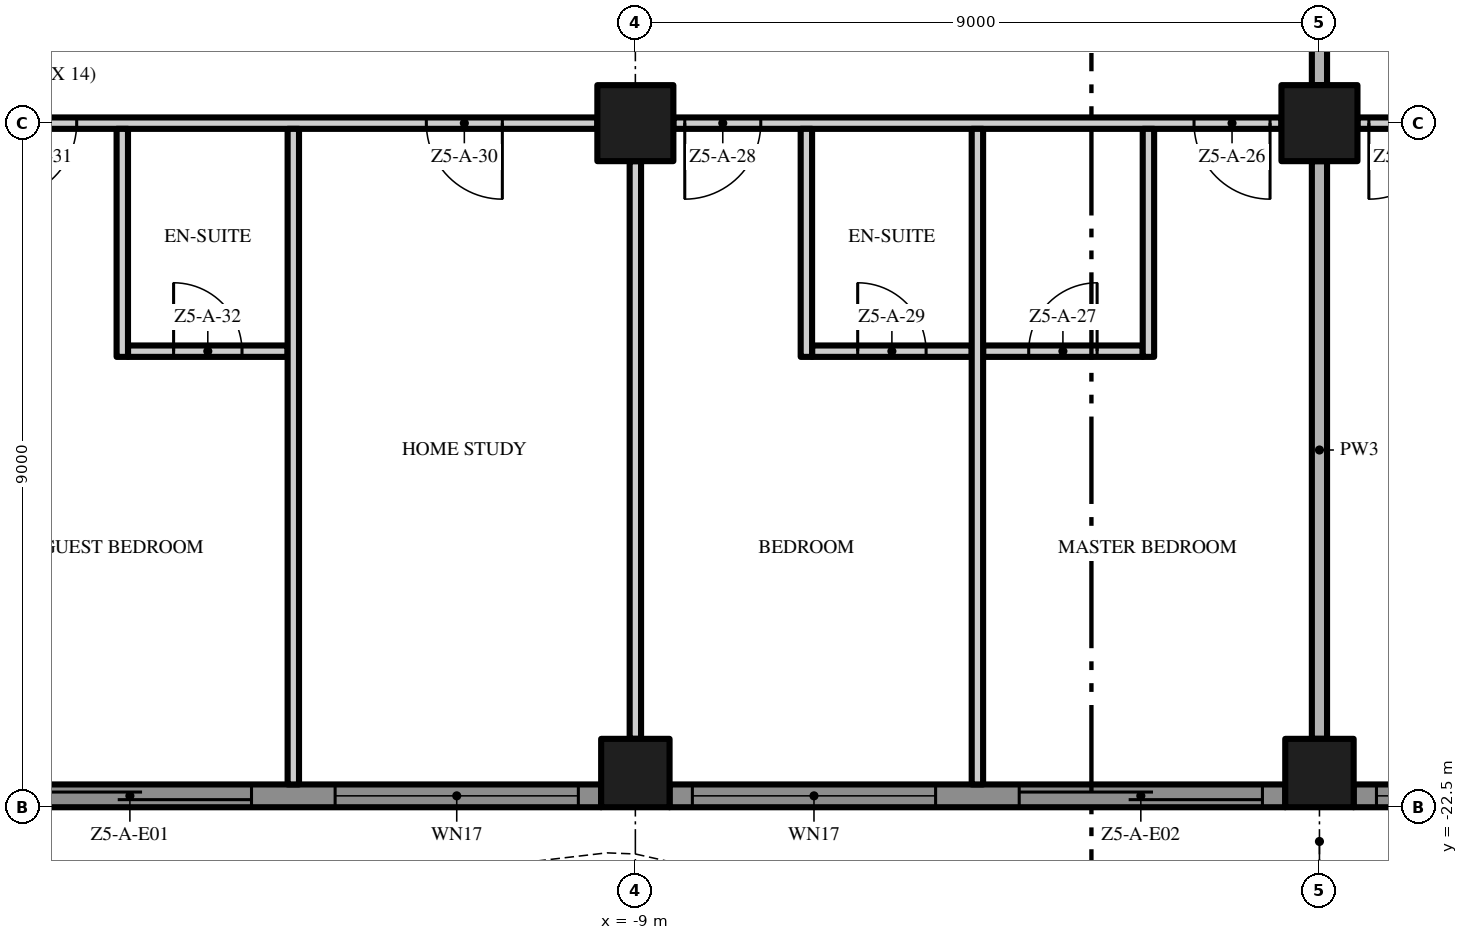
"""IFC4 building model, lengths in metres.
Left out: names, types, materials, properties, quantities, classifications, styles, units other than length and angle.
Written with IfcOpenShell. Run it as: python <this file> out.ifc"""

import sys

from ifc_helpers import new_model, si_unit, direction, frame, frame_2d, origin, origin_2d, place, context, subcontext, project, spatial, polyline, rectangle, outline, extrude, element, fill, save


model = new_model("IFC4")
c1 = context("Model", 3, precision=1e-05, world=origin(), true_north=direction((0.0, 1.0)))
c2 = subcontext(c1, "Body", "Model", "MODEL_VIEW")
j1 = project(units=[si_unit("LENGTHUNIT", "METRE"), si_unit("PLANEANGLEUNIT", "RADIAN")], contexts=[c1])
p1 = place(None, origin())
s1 = spatial("IfcSite", under=j1, at=p1, CompositionType="ELEMENT")
p2 = place(p1, origin())
s2 = spatial("IfcBuilding", under=s1, at=p2, CompositionType="ELEMENT")
p3 = place(p2, frame((0.0, 0.0, 238.8)))
s3 = spatial("IfcBuildingStorey", under=s2, at=p3, CompositionType="ELEMENT", Elevation=238.8)
p4 = place(p3, frame((-9.0, -13.5, 0.0), z_axis=(0.0, 0.0, 1.0), x_axis=(1.0, 0.0, 0.0)))
e1 = element("IfcColumn", 1, at=p4, inside=s3, PredefinedType="COLUMN", context=c2, shape_type="SweptSolid", body=[
    extrude(rectangle(XDim=1.0, YDim=1.0, at=origin_2d()), origin(), (0.0, 0.0, 1.0), 3.5),
])
p5 = place(p3, frame((-9.0, -22.05, 0.0), z_axis=(0.0, 0.0, 1.0), x_axis=(1.0, 0.0, 0.0)))
e2 = element("IfcColumn", 2, at=p5, inside=s3, PredefinedType="COLUMN", context=c2, shape_type="SweptSolid", body=[
    extrude(rectangle(XDim=0.9, YDim=0.9, at=origin_2d()), origin(), (0.0, 0.0, 1.0), 3.5),
])
p6 = place(p3, frame((0.0, -13.5, 0.0), z_axis=(0.0, 0.0, 1.0), x_axis=(1.0, 0.0, 0.0)))
e3 = element("IfcColumn", 3, at=p6, inside=s3, PredefinedType="COLUMN", context=c2, shape_type="SweptSolid", body=[
    extrude(rectangle(XDim=1.0, YDim=1.0, at=origin_2d()), origin(), (0.0, 0.0, 1.0), 3.5),
])
p7 = place(p3, frame((0.0, -22.05, 0.0), z_axis=(0.0, 0.0, 1.0), x_axis=(1.0, 0.0, 0.0)))
e4 = element("IfcColumn", 4, at=p7, inside=s3, PredefinedType="COLUMN", context=c2, shape_type="SweptSolid", body=[
    extrude(rectangle(XDim=0.9, YDim=0.9, at=origin_2d()), origin(), (0.0, 0.0, 1.0), 3.5),
])
p8 = place(p3, frame((-9.45, -22.35, 0.0), z_axis=(0.0, 0.0, 1.0), x_axis=(-1.0, 0.0, 0.0)))
e5 = element("IfcWall", 5, at=p8, inside=s3, PredefinedType="SOLIDWALL", context=c2, shape_type="SweptSolid", body=[
    extrude(rectangle(XDim=8.1, YDim=0.3, at=frame_2d((4.05, 0.0))), origin(), (0.0, 0.0, 1.0), 3.5),
])
p9 = place(p8, frame((4.6, 0.0, 0.0)))
e6 = element("IfcOpeningElement", 6, at=p9, cuts=e5, PredefinedType="OPENING", context=c2, shape_type="SweptSolid", body=[
    extrude(rectangle(XDim=3.2, YDim=2.4, at=frame_2d((1.6, 1.2))), frame((0.0, 0.16, 0.0), z_axis=(0.0, -1.0, 0.0), x_axis=(1.0, 0.0, 0.0)), (0.0, 0.0, 1.0), 0.32),
])
p10 = place(p8, frame((0.3, 0.0, 0.45)))
e7 = element("IfcOpeningElement", 7, at=p10, cuts=e5, PredefinedType="OPENING", context=c2, shape_type="SweptSolid", body=[
    extrude(rectangle(XDim=3.2, YDim=2.65, at=frame_2d((1.6, 1.325))), frame((0.0, 0.16, 0.0), z_axis=(0.0, -1.0, 0.0), x_axis=(1.0, 0.0, 0.0)), (0.0, 0.0, 1.0), 0.32),
])
p11 = place(p3, frame((-0.45, -22.35, 0.0), z_axis=(0.0, 0.0, 1.0), x_axis=(-1.0, 0.0, 0.0)))
e8 = element("IfcWall", 8, at=p11, inside=s3, PredefinedType="SOLIDWALL", context=c2, shape_type="SweptSolid", body=[
    extrude(rectangle(XDim=8.1, YDim=0.3, at=frame_2d((4.05, 0.0))), origin(), (0.0, 0.0, 1.0), 3.5),
])
p12 = place(p11, frame((4.6, 0.0, 0.45)))
e9 = element("IfcOpeningElement", 9, at=p12, cuts=e8, PredefinedType="OPENING", context=c2, shape_type="SweptSolid", body=[
    extrude(rectangle(XDim=3.2, YDim=2.65, at=frame_2d((1.6, 1.325))), frame((0.0, 0.16, 0.0), z_axis=(0.0, -1.0, 0.0), x_axis=(1.0, 0.0, 0.0)), (0.0, 0.0, 1.0), 0.32),
])
p13 = place(p11, frame((0.3, 0.0, 0.0)))
e10 = element("IfcOpeningElement", 10, at=p13, cuts=e8, PredefinedType="OPENING", context=c2, shape_type="SweptSolid", body=[
    extrude(rectangle(XDim=3.2, YDim=2.4, at=frame_2d((1.6, 1.2))), frame((0.0, 0.16, 0.0), z_axis=(0.0, -1.0, 0.0), x_axis=(1.0, 0.0, 0.0)), (0.0, 0.0, 1.0), 0.32),
])
p14 = place(p3, frame((8.55, -22.35, 0.0), z_axis=(0.0, 0.0, 1.0), x_axis=(-1.0, 0.0, 0.0)))
e11 = element("IfcWall", 11, at=p14, inside=s3, PredefinedType="SOLIDWALL", context=c2, shape_type="SweptSolid", body=[
    extrude(rectangle(XDim=8.1, YDim=0.3, at=frame_2d((4.05, 0.0))), origin(), (0.0, 0.0, 1.0), 3.5),
])
p15 = place(p14, frame((4.6, 0.0, 0.45)))
e12 = element("IfcOpeningElement", 12, at=p15, cuts=e11, PredefinedType="OPENING", context=c2, shape_type="SweptSolid", body=[
    extrude(rectangle(XDim=3.2, YDim=2.65, at=frame_2d((1.6, 1.325))), frame((0.0, 0.16, 0.0), z_axis=(0.0, -1.0, 0.0), x_axis=(1.0, 0.0, 0.0)), (0.0, 0.0, 1.0), 0.32),
])
p16 = place(p14, frame((0.3, 0.0, 0.45)))
e13 = element("IfcOpeningElement", 13, at=p16, cuts=e11, PredefinedType="OPENING", context=c2, shape_type="SweptSolid", body=[
    extrude(rectangle(XDim=3.2, YDim=2.65, at=frame_2d((1.6, 1.325))), frame((0.0, 0.16, 0.0), z_axis=(0.0, -1.0, 0.0), x_axis=(1.0, 0.0, 0.0)), (0.0, 0.0, 1.0), 0.32),
])
p17 = place(p3, origin())
e14 = element("IfcWall", 14, at=p17, inside=s3, PredefinedType="USERDEFINED", context=c2, shape_type="SweptSolid", body=[
    extrude(outline(polyline([(-22.5, -23.451), (-21.0, -24.112), (-19.5, -24.845), (-18.0, -25.369), (-16.875, -25.5), (-16.5, -25.485), (-15.0, -25.149), (-13.5, -24.488), (-12.0, -23.755), (-10.5, -23.231), (-9.375, -23.1), (-9.0, -23.115), (-7.5, -23.451), (-6.0, -24.112), (-4.5, -24.845), (-3.0, -25.369), (-1.875, -25.5), (-1.5, -25.485), (0.0, -25.149), (1.5, -24.488), (3.0, -23.755), (4.5, -23.231), (5.625, -23.1), (6.0, -23.115), (7.5, -23.451), (9.0, -24.112), (10.5, -24.845), (12.0, -25.369), (13.125, -25.5), (13.5, -25.485), (15.0, -25.149), (16.5, -24.488), (18.0, -23.755), (19.5, -23.231), (20.625, -23.1), (21.0, -23.115), (22.5, -23.451), (22.555, -23.208), (21.033, -22.866), (20.615, -22.849), (19.444, -22.986), (17.904, -23.524), (16.395, -24.261), (14.921, -24.91), (13.467, -25.236), (13.135, -25.249), (12.056, -25.124), (10.596, -24.614), (9.105, -23.885), (7.579, -23.213), (6.033, -22.866), (5.615, -22.849), (4.444, -22.986), (2.904, -23.524), (1.395, -24.261), (-0.079, -24.91), (-1.533, -25.236), (-1.865, -25.249), (-2.944, -25.124), (-4.404, -24.614), (-5.895, -23.885), (-7.421, -23.213), (-8.967, -22.866), (-9.385, -22.849), (-10.556, -22.986), (-12.096, -23.524), (-13.605, -24.261), (-15.079, -24.91), (-16.533, -25.236), (-16.865, -25.249), (-17.944, -25.124), (-19.404, -24.614), (-20.895, -23.885), (-22.399, -23.223), (-22.5, -23.451)])), origin(), (0.0, 0.0, 1.0), 0.9),
])
p18 = place(p3, frame((-15.675, -16.5, 0.0), z_axis=(0.0, 0.0, 1.0), x_axis=(1.0, 0.0, 0.0)))
e15 = element("IfcWall", 15, at=p18, inside=s3, PredefinedType="PARTITIONING", context=c2, shape_type="SweptSolid", body=[
    extrude(rectangle(XDim=2.1, YDim=0.15, at=frame_2d((1.05, 0.0))), origin(), (0.0, 0.0, 1.0), 3.5),
])
p19 = place(p18, frame((0.6, 0.0, 0.0)))
e16 = element("IfcOpeningElement", 16, at=p19, cuts=e15, PredefinedType="OPENING", context=c2, shape_type="SweptSolid", body=[
    extrude(rectangle(XDim=0.9, YDim=2.1, at=frame_2d((0.45, 1.05))), frame((0.0, 0.085, 0.0), z_axis=(0.0, -1.0, 0.0), x_axis=(1.0, 0.0, 0.0)), (0.0, 0.0, 1.0), 0.17),
])
p20 = place(p3, frame((-6.675, -16.5, 0.0), z_axis=(0.0, 0.0, 1.0), x_axis=(1.0, 0.0, 0.0)))
e17 = element("IfcWall", 17, at=p20, inside=s3, PredefinedType="PARTITIONING", context=c2, shape_type="SweptSolid", body=[
    extrude(rectangle(XDim=2.1, YDim=0.15, at=frame_2d((1.05, 0.0))), origin(), (0.0, 0.0, 1.0), 3.5),
])
p21 = place(p20, frame((0.6, 0.0, 0.0)))
e18 = element("IfcOpeningElement", 18, at=p21, cuts=e17, PredefinedType="OPENING", context=c2, shape_type="SweptSolid", body=[
    extrude(rectangle(XDim=0.9, YDim=2.1, at=frame_2d((0.45, 1.05))), frame((0.0, 0.085, 0.0), z_axis=(0.0, -1.0, 0.0), x_axis=(1.0, 0.0, 0.0)), (0.0, 0.0, 1.0), 0.17),
])
p22 = place(p3, frame((-4.425, -16.5, 0.0), z_axis=(0.0, 0.0, 1.0), x_axis=(1.0, 0.0, 0.0)))
e19 = element("IfcWall", 19, at=p22, inside=s3, PredefinedType="PARTITIONING", context=c2, shape_type="SweptSolid", body=[
    extrude(rectangle(XDim=2.1, YDim=0.15, at=frame_2d((1.05, 0.0))), origin(), (0.0, 0.0, 1.0), 3.5),
])
p23 = place(p22, frame((0.6, 0.0, 0.0)))
e20 = element("IfcOpeningElement", 20, at=p23, cuts=e19, PredefinedType="OPENING", context=c2, shape_type="SweptSolid", body=[
    extrude(rectangle(XDim=0.9, YDim=2.1, at=frame_2d((0.45, 1.05))), frame((0.0, 0.085, 0.0), z_axis=(0.0, -1.0, 0.0), x_axis=(1.0, 0.0, 0.0)), (0.0, 0.0, 1.0), 0.17),
])
p24 = place(p3, frame((-9.5, -13.5, 0.0), z_axis=(0.0, 0.0, 1.0), x_axis=(-1.0, 0.0, 0.0)))
e21 = element("IfcWall", 21, at=p24, inside=s3, PredefinedType="PARTITIONING", context=c2, shape_type="SweptSolid", body=[
    extrude(rectangle(XDim=8.0, YDim=0.15, at=frame_2d((4.0, 0.0))), origin(), (0.0, 0.0, 1.0), 3.5),
])
p25 = place(p24, frame((1.25, 0.0, 0.0)))
e22 = element("IfcOpeningElement", 22, at=p25, cuts=e21, PredefinedType="OPENING", context=c2, shape_type="SweptSolid", body=[
    extrude(rectangle(XDim=1.0, YDim=2.4, at=frame_2d((0.5, 1.2))), frame((0.0, 0.085, 0.0), z_axis=(0.0, -1.0, 0.0), x_axis=(1.0, 0.0, 0.0)), (0.0, 0.0, 1.0), 0.17),
])
p26 = place(p24, frame((6.85, 0.0, 0.0)))
e23 = element("IfcOpeningElement", 23, at=p26, cuts=e21, PredefinedType="OPENING", context=c2, shape_type="SweptSolid", body=[
    extrude(rectangle(XDim=1.0, YDim=2.4, at=frame_2d((0.5, 1.2))), frame((0.0, 0.085, 0.0), z_axis=(0.0, -1.0, 0.0), x_axis=(1.0, 0.0, 0.0)), (0.0, 0.0, 1.0), 0.17),
])
p27 = place(p3, frame((-0.5, -13.5, 0.0), z_axis=(0.0, 0.0, 1.0), x_axis=(-1.0, 0.0, 0.0)))
e24 = element("IfcWall", 24, at=p27, inside=s3, PredefinedType="PARTITIONING", context=c2, shape_type="SweptSolid", body=[
    extrude(rectangle(XDim=8.0, YDim=0.15, at=frame_2d((4.0, 0.0))), origin(), (0.0, 0.0, 1.0), 3.5),
])
p28 = place(p27, frame((0.15, 0.0, 0.0)))
e25 = element("IfcOpeningElement", 25, at=p28, cuts=e24, PredefinedType="OPENING", context=c2, shape_type="SweptSolid", body=[
    extrude(rectangle(XDim=1.0, YDim=2.4, at=frame_2d((0.5, 1.2))), frame((0.0, 0.085, 0.0), z_axis=(0.0, -1.0, 0.0), x_axis=(1.0, 0.0, 0.0)), (0.0, 0.0, 1.0), 0.17),
])
p29 = place(p27, frame((6.85, 0.0, 0.0)))
e26 = element("IfcOpeningElement", 26, at=p29, cuts=e24, PredefinedType="OPENING", context=c2, shape_type="SweptSolid", body=[
    extrude(rectangle(XDim=1.0, YDim=2.4, at=frame_2d((0.5, 1.2))), frame((0.0, 0.085, 0.0), z_axis=(0.0, -1.0, 0.0), x_axis=(1.0, 0.0, 0.0)), (0.0, 0.0, 1.0), 0.17),
])
p30 = place(p3, frame((8.5, -13.5, 0.0), z_axis=(0.0, 0.0, 1.0), x_axis=(-1.0, 0.0, 0.0)))
e27 = element("IfcWall", 27, at=p30, inside=s3, PredefinedType="PARTITIONING", context=c2, shape_type="SweptSolid", body=[
    extrude(rectangle(XDim=8.0, YDim=0.15, at=frame_2d((4.0, 0.0))), origin(), (0.0, 0.0, 1.0), 3.5),
])
p31 = place(p30, frame((1.25, 0.0, 0.0)))
e28 = element("IfcOpeningElement", 28, at=p31, cuts=e27, PredefinedType="OPENING", context=c2, shape_type="SweptSolid", body=[
    extrude(rectangle(XDim=1.0, YDim=2.4, at=frame_2d((0.5, 1.2))), frame((0.0, 0.085, 0.0), z_axis=(0.0, -1.0, 0.0), x_axis=(1.0, 0.0, 0.0)), (0.0, 0.0, 1.0), 0.17),
])
p32 = place(p30, frame((6.85, 0.0, 0.0)))
e29 = element("IfcOpeningElement", 29, at=p32, cuts=e27, PredefinedType="OPENING", context=c2, shape_type="SweptSolid", body=[
    extrude(rectangle(XDim=1.0, YDim=2.4, at=frame_2d((0.5, 1.2))), frame((0.0, 0.085, 0.0), z_axis=(0.0, -1.0, 0.0), x_axis=(1.0, 0.0, 0.0)), (0.0, 0.0, 1.0), 0.17),
])
p33 = place(p3, frame((-15.75, -16.575, 0.0), z_axis=(0.0, 0.0, 1.0), x_axis=(0.0, 1.0, 0.0)))
e30 = element("IfcWall", 30, at=p33, inside=s3, PredefinedType="PARTITIONING", context=c2, shape_type="SweptSolid", body=[
    extrude(rectangle(XDim=3.0, YDim=0.15, at=frame_2d((1.5, 0.0))), origin(), (0.0, 0.0, 1.0), 3.5),
])
p34 = place(p3, frame((-13.5, -22.2, 0.0), z_axis=(0.0, 0.0, 1.0), x_axis=(0.0, 1.0, 0.0)))
e31 = element("IfcWall", 31, at=p34, inside=s3, PredefinedType="PARTITIONING", context=c2, shape_type="SweptSolid", body=[
    extrude(rectangle(XDim=8.625, YDim=0.15, at=frame_2d((4.312, 0.0))), origin(), (0.0, 0.0, 1.0), 3.5),
])
p35 = place(p3, frame((-9.0, -21.6, 0.0), z_axis=(0.0, 0.0, 1.0), x_axis=(0.0, 1.0, 0.0)))
e32 = element("IfcWall", 32, at=p35, inside=s3, PredefinedType="PARTITIONING", context=c2, shape_type="SweptSolid", body=[
    extrude(rectangle(XDim=7.6, YDim=0.15, at=frame_2d((3.8, 0.0))), origin(), (0.0, 0.0, 1.0), 3.5),
])
p36 = place(p3, frame((-6.75, -16.575, 0.0), z_axis=(0.0, 0.0, 1.0), x_axis=(0.0, 1.0, 0.0)))
e33 = element("IfcWall", 33, at=p36, inside=s3, PredefinedType="PARTITIONING", context=c2, shape_type="SweptSolid", body=[
    extrude(rectangle(XDim=3.0, YDim=0.15, at=frame_2d((1.5, 0.0))), origin(), (0.0, 0.0, 1.0), 3.5),
])
p37 = place(p3, frame((-4.5, -22.2, 0.0), z_axis=(0.0, 0.0, 1.0), x_axis=(0.0, 1.0, 0.0)))
e34 = element("IfcWall", 34, at=p37, inside=s3, PredefinedType="PARTITIONING", context=c2, shape_type="SweptSolid", body=[
    extrude(rectangle(XDim=8.625, YDim=0.15, at=frame_2d((4.312, 0.0))), origin(), (0.0, 0.0, 1.0), 3.5),
])
p38 = place(p3, frame((-2.25, -16.575, 0.0), z_axis=(0.0, 0.0, 1.0), x_axis=(0.0, 1.0, 0.0)))
e35 = element("IfcWall", 35, at=p38, inside=s3, PredefinedType="PARTITIONING", context=c2, shape_type="SweptSolid", body=[
    extrude(rectangle(XDim=3.0, YDim=0.15, at=frame_2d((1.5, 0.0))), origin(), (0.0, 0.0, 1.0), 3.5),
])
p39 = place(p3, frame((0.0, -21.6, 0.0), z_axis=(0.0, 0.0, 1.0), x_axis=(0.0, 1.0, 0.0)))
e36 = element("IfcWall", 36, at=p39, inside=s3, PredefinedType="PARTITIONING", context=c2, shape_type="SweptSolid", body=[
    extrude(rectangle(XDim=7.6, YDim=0.2, at=frame_2d((3.8, 0.0))), origin(), (0.0, 0.0, 1.0), 3.5),
])
p40 = place(p3, frame((0.0, -13.0, 0.0), z_axis=(0.0, 0.0, 1.0), x_axis=(0.0, 1.0, 0.0)))
e37 = element("IfcWall", 37, at=p40, inside=s3, PredefinedType="PARTITIONING", context=c2, shape_type="SweptSolid", body=[
    extrude(rectangle(XDim=8.0, YDim=0.2, at=frame_2d((4.0, 0.0))), origin(), (0.0, 0.0, 1.0), 3.5),
])
p41 = place(p9, origin())
e38 = element("IfcDoor", 38, at=p41, inside=s3, OperationType="SINGLE_SWING_LEFT", PredefinedType="DOOR", context=c2, shape_type="SweptSolid", body=[
    extrude(rectangle(XDim=3.2, YDim=2.4, at=frame_2d((1.6, 1.2))), frame((0.0, 0.025, 0.0), z_axis=(0.0, -1.0, 0.0), x_axis=(1.0, 0.0, 0.0)), (0.0, 0.0, 1.0), 0.05),
])
fill(e6, e38)
p42 = place(p10, origin())
e39 = element("IfcWindow", 39, at=p42, inside=s3, PartitioningType="SINGLE_PANEL", PredefinedType="WINDOW", context=c2, shape_type="SweptSolid", body=[
    extrude(rectangle(XDim=3.2, YDim=2.65, at=frame_2d((1.6, 1.325))), frame((0.0, 0.03, 0.0), z_axis=(0.0, -1.0, 0.0), x_axis=(1.0, 0.0, 0.0)), (0.0, 0.0, 1.0), 0.06),
])
fill(e7, e39)
p43 = place(p12, origin())
e40 = element("IfcWindow", 40, at=p43, inside=s3, PartitioningType="SINGLE_PANEL", PredefinedType="WINDOW", context=c2, shape_type="SweptSolid", body=[
    extrude(rectangle(XDim=3.2, YDim=2.65, at=frame_2d((1.6, 1.325))), frame((0.0, 0.03, 0.0), z_axis=(0.0, -1.0, 0.0), x_axis=(1.0, 0.0, 0.0)), (0.0, 0.0, 1.0), 0.06),
])
fill(e9, e40)
p44 = place(p13, origin())
e41 = element("IfcDoor", 41, at=p44, inside=s3, OperationType="SINGLE_SWING_LEFT", PredefinedType="DOOR", context=c2, shape_type="SweptSolid", body=[
    extrude(rectangle(XDim=3.2, YDim=2.4, at=frame_2d((1.6, 1.2))), frame((0.0, 0.025, 0.0), z_axis=(0.0, -1.0, 0.0), x_axis=(1.0, 0.0, 0.0)), (0.0, 0.0, 1.0), 0.05),
])
fill(e10, e41)
p45 = place(p15, origin())
e42 = element("IfcWindow", 42, at=p45, inside=s3, PartitioningType="SINGLE_PANEL", PredefinedType="WINDOW", context=c2, shape_type="SweptSolid", body=[
    extrude(rectangle(XDim=3.2, YDim=2.65, at=frame_2d((1.6, 1.325))), frame((0.0, 0.03, 0.0), z_axis=(0.0, -1.0, 0.0), x_axis=(1.0, 0.0, 0.0)), (0.0, 0.0, 1.0), 0.06),
])
fill(e12, e42)
p46 = place(p28, origin())
e43 = element("IfcDoor", 43, at=p46, inside=s3, OperationType="SINGLE_SWING_LEFT", PredefinedType="DOOR", context=c2, shape_type="SweptSolid", body=[
    extrude(rectangle(XDim=1.0, YDim=2.4, at=frame_2d((0.5, 1.2))), frame((0.0, 0.025, 0.0), z_axis=(0.0, -1.0, 0.0), x_axis=(1.0, 0.0, 0.0)), (0.0, 0.0, 1.0), 0.05),
])
fill(e25, e43)
p47 = place(p23, origin())
e44 = element("IfcDoor", 44, at=p47, inside=s3, OperationType="SINGLE_SWING_RIGHT", PredefinedType="DOOR", context=c2, shape_type="SweptSolid", body=[
    extrude(rectangle(XDim=0.9, YDim=2.1, at=frame_2d((0.45, 1.05))), frame((0.0, 0.025, 0.0), z_axis=(0.0, -1.0, 0.0), x_axis=(1.0, 0.0, 0.0)), (0.0, 0.0, 1.0), 0.05),
])
fill(e20, e44)
p48 = place(p29, origin())
e45 = element("IfcDoor", 45, at=p48, inside=s3, OperationType="SINGLE_SWING_RIGHT", PredefinedType="DOOR", context=c2, shape_type="SweptSolid", body=[
    extrude(rectangle(XDim=1.0, YDim=2.4, at=frame_2d((0.5, 1.2))), frame((0.0, 0.025, 0.0), z_axis=(0.0, -1.0, 0.0), x_axis=(1.0, 0.0, 0.0)), (0.0, 0.0, 1.0), 0.05),
])
fill(e26, e45)
p49 = place(p21, origin())
e46 = element("IfcDoor", 46, at=p49, inside=s3, OperationType="SINGLE_SWING_LEFT", PredefinedType="DOOR", context=c2, shape_type="SweptSolid", body=[
    extrude(rectangle(XDim=0.9, YDim=2.1, at=frame_2d((0.45, 1.05))), frame((0.0, 0.025, 0.0), z_axis=(0.0, -1.0, 0.0), x_axis=(1.0, 0.0, 0.0)), (0.0, 0.0, 1.0), 0.05),
])
fill(e18, e46)
p50 = place(p25, origin())
e47 = element("IfcDoor", 47, at=p50, inside=s3, OperationType="SINGLE_SWING_LEFT", PredefinedType="DOOR", context=c2, shape_type="SweptSolid", body=[
    extrude(rectangle(XDim=1.0, YDim=2.4, at=frame_2d((0.5, 1.2))), frame((0.0, 0.025, 0.0), z_axis=(0.0, -1.0, 0.0), x_axis=(1.0, 0.0, 0.0)), (0.0, 0.0, 1.0), 0.05),
])
fill(e22, e47)
p51 = place(p26, origin())
e48 = element("IfcDoor", 48, at=p51, inside=s3, OperationType="SINGLE_SWING_RIGHT", PredefinedType="DOOR", context=c2, shape_type="SweptSolid", body=[
    extrude(rectangle(XDim=1.0, YDim=2.4, at=frame_2d((0.5, 1.2))), frame((0.0, 0.025, 0.0), z_axis=(0.0, -1.0, 0.0), x_axis=(1.0, 0.0, 0.0)), (0.0, 0.0, 1.0), 0.05),
])
fill(e23, e48)
p52 = place(p19, origin())
e49 = element("IfcDoor", 49, at=p52, inside=s3, OperationType="SINGLE_SWING_LEFT", PredefinedType="DOOR", context=c2, shape_type="SweptSolid", body=[
    extrude(rectangle(XDim=0.9, YDim=2.1, at=frame_2d((0.45, 1.05))), frame((0.0, 0.025, 0.0), z_axis=(0.0, -1.0, 0.0), x_axis=(1.0, 0.0, 0.0)), (0.0, 0.0, 1.0), 0.05),
])
fill(e16, e49)
p53 = place(p32, origin())
e50 = element("IfcDoor", 50, at=p53, inside=s3, OperationType="SINGLE_SWING_RIGHT", PredefinedType="DOOR", context=c2, shape_type="SweptSolid", body=[
    extrude(rectangle(XDim=1.0, YDim=2.4, at=frame_2d((0.5, 1.2))), frame((0.0, 0.025, 0.0), z_axis=(0.0, -1.0, 0.0), x_axis=(1.0, 0.0, 0.0)), (0.0, 0.0, 1.0), 0.05),
])
fill(e29, e50)
save(model, sys.argv[1])
